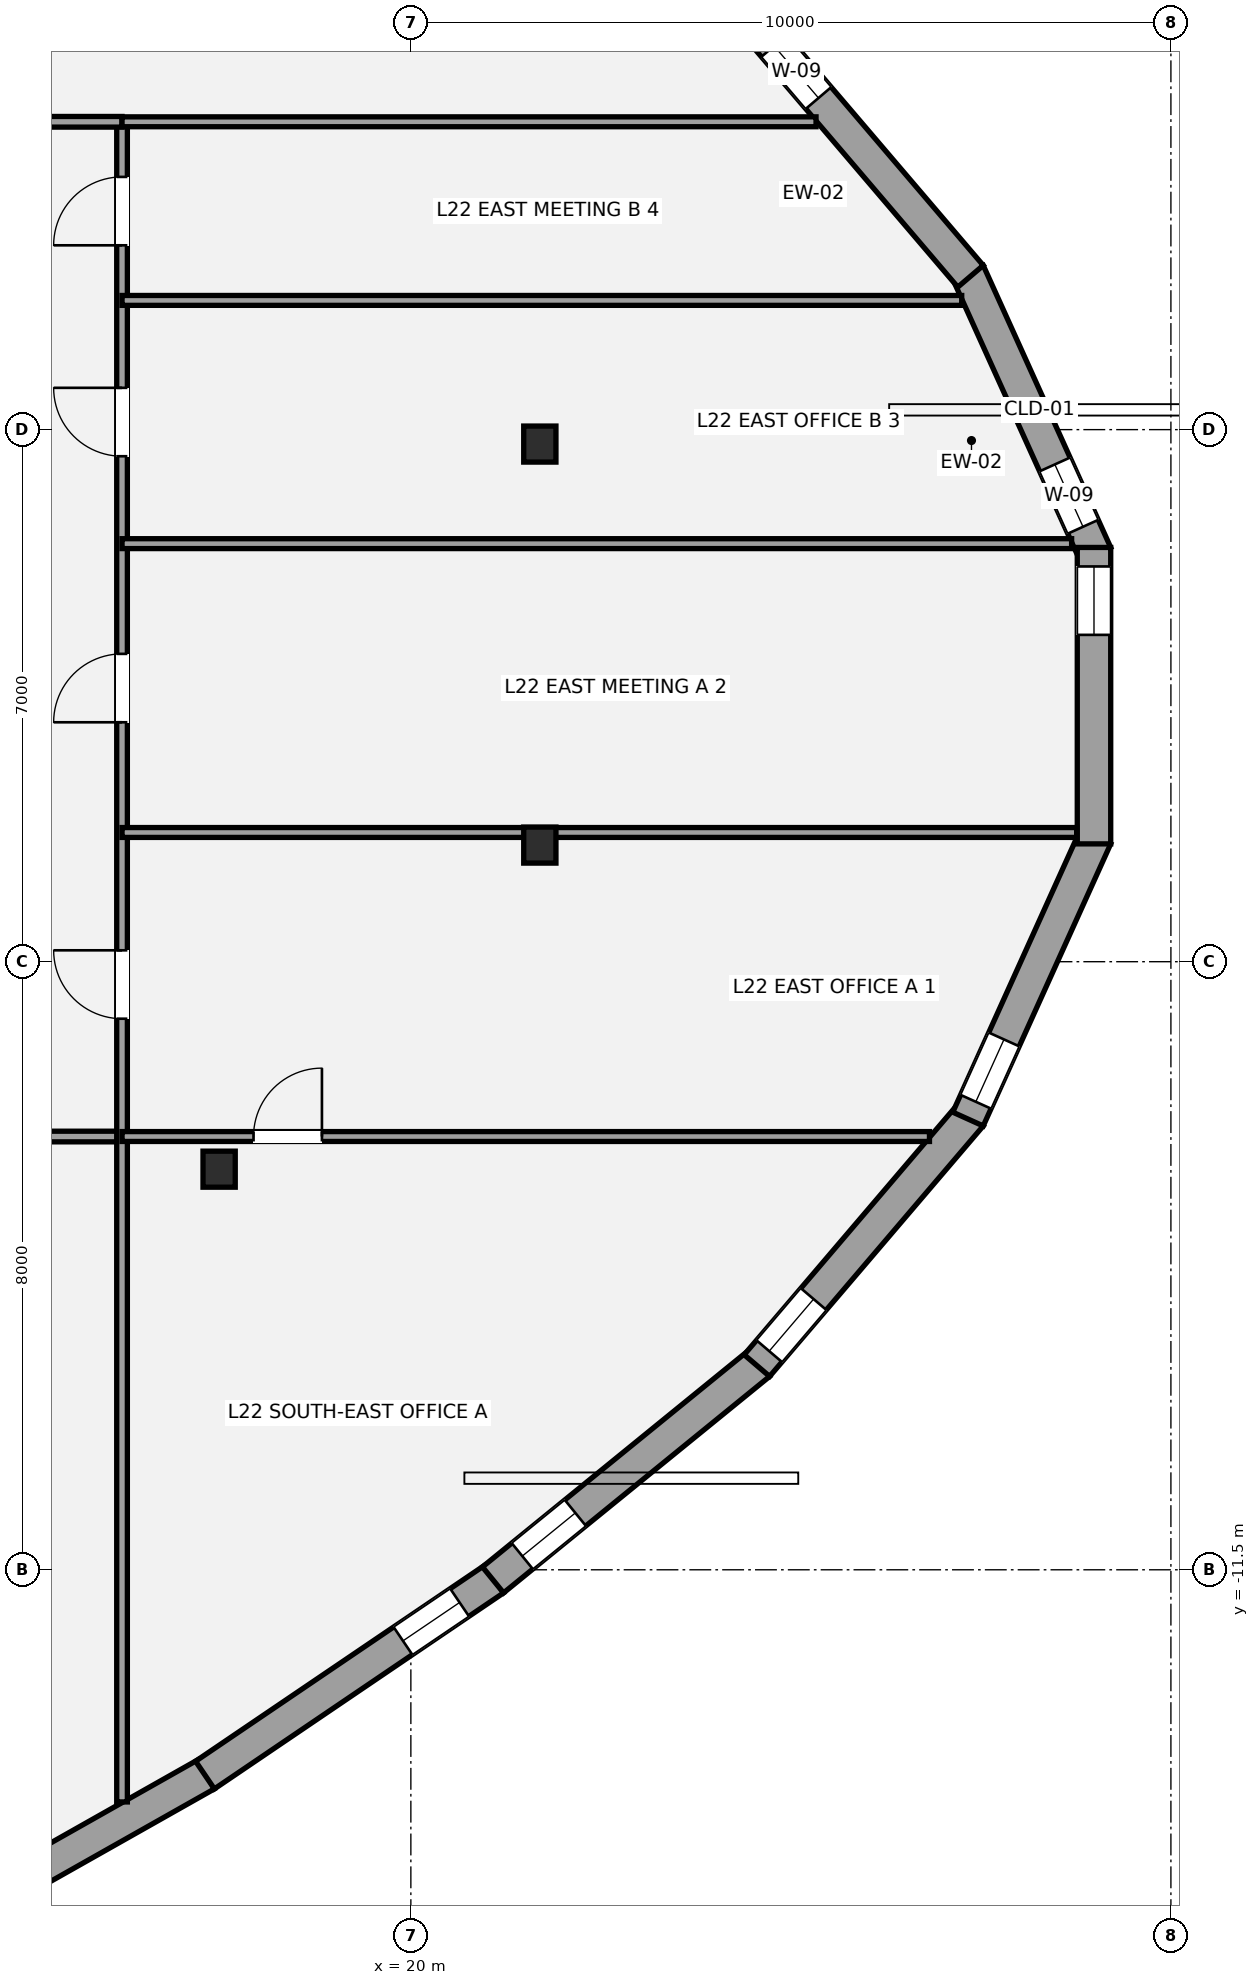
"""IFC4 building model, lengths in metres.
Left out: names, types, materials, properties, quantities, classifications, styles, units other than length and angle.
Written with IfcOpenShell. Run it as: python <this file> out.ifc"""

import sys

from ifc_helpers import new_model, si_unit, direction, frame, frame_2d, origin, origin_2d, place, context, subcontext, project, spatial, rectangle, i_section, extrude, element, fill, save


model = new_model("IFC4")
c1 = context("Model", 3, precision=1e-05, world=origin(), true_north=direction((0.0, 1.0)))
c2 = subcontext(c1, "Body", "Model", "MODEL_VIEW")
j1 = project(units=[si_unit("LENGTHUNIT", "METRE"), si_unit("PLANEANGLEUNIT", "RADIAN")], contexts=[c1])
p1 = place(None, origin())
s1 = spatial("IfcSite", under=j1, at=p1, CompositionType="ELEMENT")
p2 = place(p1, origin())
s2 = spatial("IfcBuilding", under=s1, at=p2, CompositionType="ELEMENT")
p3 = place(p2, frame((0.0, 0.0, 86.1)))
s3 = spatial("IfcBuildingStorey", under=s2, at=p3, CompositionType="ELEMENT", Elevation=86.1)
for number, where, z_axis, x_axis in (
    (1, (21.697, 3.31, 0.0), (0.0, 0.0, 1.0), (1.0, 0.0, 0.0)),
    (2, (17.477, -6.229, 0.0), (0.0, 0.0, 1.0), (1.0, 0.0, 0.0)),
    (3, (21.697, -1.966, 0.0), (0.0, 0.0, 1.0), (1.0, 0.0, 0.0)),
):
    element("IfcColumn", number, at=place(p3, frame(where, z_axis=z_axis, x_axis=x_axis)), inside=s3, PredefinedType="COLUMN", context=c2, shape_type="SweptSolid", body=[
        extrude(i_section(OverallWidth=0.424, OverallDepth=0.474, WebThickness=0.048, FlangeThickness=0.077, at=origin_2d()), origin(), (0.0, 0.0, 1.0), 3.5),
    ])
p4 = place(p3, frame((27.331, 5.57, 0.0), z_axis=(0.0, 0.0, 1.0), x_axis=(0.411809988363, -0.911269736952, 0.0)))
e4 = element("IfcWall", 4, at=p4, inside=s3, PredefinedType="STANDARD", context=c2, shape_type="SweptSolid", body=[
    extrude(rectangle(XDim=4.072, YDim=0.44, at=frame_2d((2.036, 0.0))), origin(), (0.0, 0.0, 1.0), 2.528),
])
p5 = place(p4, frame((2.774, 0.0, 0.58)))
e5 = element("IfcOpeningElement", 5, at=p5, cuts=e4, PredefinedType="OPENING", context=c2, shape_type="SweptSolid", body=[
    extrude(rectangle(XDim=0.9, YDim=1.35, at=frame_2d((0.45, 0.675))), frame((0.0, 0.23, 0.0), z_axis=(0.0, -1.0, 0.0), x_axis=(1.0, 0.0, 0.0)), (0.0, 0.0, 1.0), 0.46),
])
p6 = place(p3, frame((24.553, 8.813, 0.0), z_axis=(0.0, 0.0, 1.0), x_axis=(0.648913975558, -0.760861782669, 0.0)))
e6 = element("IfcWall", 6, at=p6, inside=s3, PredefinedType="STANDARD", context=c2, shape_type="SweptSolid", body=[
    extrude(rectangle(XDim=4.331, YDim=0.44, at=frame_2d((2.166, 0.0))), origin(), (0.0, 0.0, 1.0), 2.528),
])
p7 = place(p6, frame((0.349, 0.0, 0.58)))
e7 = element("IfcOpeningElement", 7, at=p7, cuts=e6, PredefinedType="OPENING", context=c2, shape_type="SweptSolid", body=[
    extrude(rectangle(XDim=0.9, YDim=1.35, at=frame_2d((0.45, 0.675))), frame((0.0, 0.23, 0.0), z_axis=(0.0, -1.0, 0.0), x_axis=(1.0, 0.0, 0.0)), (0.0, 0.0, 1.0), 0.46),
])
p8 = place(p3, frame((17.306, -14.191, 0.0), z_axis=(0.0, 0.0, 1.0), x_axis=(-0.870732411856, -0.491757121903, 0.0)))
e8 = element("IfcWall", 8, at=p8, inside=s3, PredefinedType="STANDARD", context=c2, shape_type="SweptSolid", body=[
    extrude(rectangle(XDim=4.825, YDim=0.44, at=frame_2d((2.413, 0.0))), origin(), (0.0, 0.0, 1.0), 2.528),
])
p9 = place(p8, frame((3.278, 0.0, 0.58)))
e9 = element("IfcOpeningElement", 9, at=p9, cuts=e8, PredefinedType="OPENING", context=c2, shape_type="SweptSolid", body=[
    extrude(rectangle(XDim=0.9, YDim=1.35, at=frame_2d((0.45, 0.675))), frame((0.0, 0.23, 0.0), z_axis=(0.0, -1.0, 0.0), x_axis=(1.0, 0.0, 0.0)), (0.0, 0.0, 1.0), 0.46),
])
p10 = place(p3, frame((21.096, -11.622, 0.0), z_axis=(0.0, 0.0, 1.0), x_axis=(-0.827777061901, -0.561057159112, 0.0)))
e10 = element("IfcWall", 10, at=p10, inside=s3, PredefinedType="STANDARD", context=c2, shape_type="SweptSolid", body=[
    extrude(rectangle(XDim=4.597, YDim=0.44, at=frame_2d((2.298, 0.0))), origin(), (0.0, 0.0, 1.0), 2.528),
])
p11 = place(p10, frame((0.55, 0.0, 0.58)))
e11 = element("IfcOpeningElement", 11, at=p11, cuts=e10, PredefinedType="OPENING", context=c2, shape_type="SweptSolid", body=[
    extrude(rectangle(XDim=0.9, YDim=1.35, at=frame_2d((0.45, 0.675))), frame((0.0, 0.23, 0.0), z_axis=(0.0, -1.0, 0.0), x_axis=(1.0, 0.0, 0.0)), (0.0, 0.0, 1.0), 0.46),
])
p12 = place(p3, frame((24.582, -8.785, 0.0), z_axis=(0.0, 0.0, 1.0), x_axis=(-0.775728286929, -0.631067052585, 0.0)))
e12 = element("IfcWall", 12, at=p12, inside=s3, PredefinedType="STANDARD", context=c2, shape_type="SweptSolid", body=[
    extrude(rectangle(XDim=4.513, YDim=0.44, at=frame_2d((2.256, 0.0))), origin(), (0.0, 0.0, 1.0), 2.528),
])
p13 = place(p12, frame((3.116, 0.0, 0.58)))
e13 = element("IfcOpeningElement", 13, at=p13, cuts=e12, PredefinedType="OPENING", context=c2, shape_type="SweptSolid", body=[
    extrude(rectangle(XDim=0.9, YDim=1.35, at=frame_2d((0.45, 0.675))), frame((0.0, 0.23, 0.0), z_axis=(0.0, -1.0, 0.0), x_axis=(1.0, 0.0, 0.0)), (0.0, 0.0, 1.0), 0.46),
])
p14 = place(p3, frame((27.364, -5.518, 0.0), z_axis=(0.0, 0.0, 1.0), x_axis=(-0.648913975558, -0.760861782669, 0.0)))
e14 = element("IfcWall", 14, at=p14, inside=s3, PredefinedType="STANDARD", context=c2, shape_type="SweptSolid", body=[
    extrude(rectangle(XDim=4.331, YDim=0.44, at=frame_2d((2.166, 0.0))), origin(), (0.0, 0.0, 1.0), 2.528),
])
p15 = place(p14, frame((3.181, 0.0, 0.58)))
e15 = element("IfcOpeningElement", 15, at=p15, cuts=e14, PredefinedType="OPENING", context=c2, shape_type="SweptSolid", body=[
    extrude(rectangle(XDim=0.9, YDim=1.35, at=frame_2d((0.45, 0.675))), frame((0.0, 0.23, 0.0), z_axis=(0.0, -1.0, 0.0), x_axis=(1.0, 0.0, 0.0)), (0.0, 0.0, 1.0), 0.46),
])
p16 = place(p3, frame((29.008, -1.859, 0.0), z_axis=(0.0, 0.0, 1.0), x_axis=(-0.411809988363, -0.911269736952, 0.0)))
e16 = element("IfcWall", 16, at=p16, inside=s3, PredefinedType="STANDARD", context=c2, shape_type="SweptSolid", body=[
    extrude(rectangle(XDim=4.072, YDim=0.44, at=frame_2d((2.036, 0.0))), origin(), (0.0, 0.0, 1.0), 2.528),
])
p17 = place(p16, frame((2.923, 0.0, 0.58)))
e17 = element("IfcOpeningElement", 17, at=p17, cuts=e16, PredefinedType="OPENING", context=c2, shape_type="SweptSolid", body=[
    extrude(rectangle(XDim=0.9, YDim=1.35, at=frame_2d((0.45, 0.675))), frame((0.0, 0.23, 0.0), z_axis=(0.0, -1.0, 0.0), x_axis=(1.0, 0.0, 0.0)), (0.0, 0.0, 1.0), 0.46),
])
p18 = place(p3, frame((28.988, 1.95, 0.0), z_axis=(0.0, 0.0, 1.0), x_axis=(0.0, -1.0, 0.0)))
e18 = element("IfcWall", 18, at=p18, inside=s3, PredefinedType="STANDARD", context=c2, shape_type="SweptSolid", body=[
    extrude(rectangle(XDim=3.9, YDim=0.44, at=frame_2d((1.95, 0.0))), origin(), (0.0, 0.0, 1.0), 2.528),
])
p19 = place(p18, frame((0.25, 0.0, 0.58)))
e19 = element("IfcOpeningElement", 19, at=p19, cuts=e18, PredefinedType="OPENING", context=c2, shape_type="SweptSolid", body=[
    extrude(rectangle(XDim=0.9, YDim=1.35, at=frame_2d((0.45, 0.675))), frame((0.0, 0.23, 0.0), z_axis=(0.0, -1.0, 0.0), x_axis=(1.0, 0.0, 0.0)), (0.0, 0.0, 1.0), 0.46),
])
p20 = place(p3, frame((-16.2, -5.8, 0.0), z_axis=(0.0, 0.0, 1.0), x_axis=(1.0, 0.0, 0.0)))
e20 = element("IfcWall", 20, at=p20, inside=s3, PredefinedType="PARTITIONING", context=c2, shape_type="SweptSolid", body=[
    extrude(rectangle(XDim=32.4, YDim=0.14, at=frame_2d((16.2, 0.0))), origin(), (0.0, 0.0, 1.0), 2.763),
])
p21 = place(p20, frame((4.25, 0.0, 0.0)))
e21 = element("IfcOpeningElement", 21, at=p21, cuts=e20, PredefinedType="OPENING", context=c2, shape_type="SweptSolid", body=[
    extrude(rectangle(XDim=0.9, YDim=2.1, at=frame_2d((0.45, 1.05))), frame((0.0, 0.08, 0.0), z_axis=(0.0, -1.0, 0.0), x_axis=(1.0, 0.0, 0.0)), (0.0, 0.0, 1.0), 0.16),
])
p22 = place(p20, frame((13.15, 0.0, 0.0)))
e22 = element("IfcOpeningElement", 22, at=p22, cuts=e20, PredefinedType="OPENING", context=c2, shape_type="SweptSolid", body=[
    extrude(rectangle(XDim=1.5, YDim=2.15, at=frame_2d((0.75, 1.075))), frame((0.0, 0.08, 0.0), z_axis=(0.0, -1.0, 0.0), x_axis=(1.0, 0.0, 0.0)), (0.0, 0.0, 1.0), 0.16),
])
p23 = place(p20, frame((21.45, 0.0, 0.0)))
e23 = element("IfcOpeningElement", 23, at=p23, cuts=e20, PredefinedType="OPENING", context=c2, shape_type="SweptSolid", body=[
    extrude(rectangle(XDim=0.9, YDim=2.1, at=frame_2d((0.45, 1.05))), frame((0.0, 0.08, 0.0), z_axis=(0.0, -1.0, 0.0), x_axis=(1.0, 0.0, 0.0)), (0.0, 0.0, 1.0), 0.16),
])
p24 = place(p20, frame((28.15, 0.0, 0.0)))
e24 = element("IfcOpeningElement", 24, at=p24, cuts=e20, PredefinedType="OPENING", context=c2, shape_type="SweptSolid", body=[
    extrude(rectangle(XDim=1.5, YDim=2.15, at=frame_2d((0.75, 1.075))), frame((0.0, 0.08, 0.0), z_axis=(0.0, -1.0, 0.0), x_axis=(1.0, 0.0, 0.0)), (0.0, 0.0, 1.0), 0.16),
])
p25 = place(p3, frame((16.2, -14.554, 0.0), z_axis=(0.0, 0.0, 1.0), x_axis=(0.0, 1.0, 0.0)))
e25 = element("IfcWall", 25, at=p25, inside=s3, PredefinedType="PARTITIONING", context=c2, shape_type="SweptSolid", body=[
    extrude(rectangle(XDim=22.104, YDim=0.14, at=frame_2d((11.052, 0.0))), origin(), (0.0, 0.0, 1.0), 2.751),
])
p26 = place(p25, frame((10.304, 0.0, 0.0)))
e26 = element("IfcOpeningElement", 26, at=p26, cuts=e25, PredefinedType="OPENING", context=c2, shape_type="SweptSolid", body=[
    extrude(rectangle(XDim=0.9, YDim=2.1, at=frame_2d((0.45, 1.05))), frame((0.0, 0.08, 0.0), z_axis=(0.0, -1.0, 0.0), x_axis=(1.0, 0.0, 0.0)), (0.0, 0.0, 1.0), 0.16),
])
p27 = place(p25, frame((14.204, 0.0, 0.0)))
e27 = element("IfcOpeningElement", 27, at=p27, cuts=e25, PredefinedType="OPENING", context=c2, shape_type="SweptSolid", body=[
    extrude(rectangle(XDim=0.9, YDim=2.1, at=frame_2d((0.45, 1.05))), frame((0.0, 0.08, 0.0), z_axis=(0.0, -1.0, 0.0), x_axis=(1.0, 0.0, 0.0)), (0.0, 0.0, 1.0), 0.16),
])
p28 = place(p25, frame((17.704, 0.0, 0.0)))
e28 = element("IfcOpeningElement", 28, at=p28, cuts=e25, PredefinedType="OPENING", context=c2, shape_type="SweptSolid", body=[
    extrude(rectangle(XDim=0.9, YDim=2.1, at=frame_2d((0.45, 1.05))), frame((0.0, 0.08, 0.0), z_axis=(0.0, -1.0, 0.0), x_axis=(1.0, 0.0, 0.0)), (0.0, 0.0, 1.0), 0.16),
])
p29 = place(p25, frame((20.479, 0.0, 0.0)))
e29 = element("IfcOpeningElement", 29, at=p29, cuts=e25, PredefinedType="OPENING", context=c2, shape_type="SweptSolid", body=[
    extrude(rectangle(XDim=0.9, YDim=2.1, at=frame_2d((0.45, 1.05))), frame((0.0, 0.08, 0.0), z_axis=(0.0, -1.0, 0.0), x_axis=(1.0, 0.0, 0.0)), (0.0, 0.0, 1.0), 0.16),
])
p30 = place(p3, frame((13.9, 7.55, 0.0), z_axis=(0.0, 0.0, 1.0), x_axis=(1.0, 0.0, 0.0)))
e30 = element("IfcWall", 30, at=p30, inside=s3, PredefinedType="PARTITIONING", context=c2, shape_type="SweptSolid", body=[
    extrude(rectangle(XDim=2.3, YDim=0.14, at=frame_2d((1.15, 0.0))), origin(), (0.0, 0.0, 1.0), 2.763),
])
p31 = place(p30, frame((0.32, 0.0, 0.0)))
e31 = element("IfcOpeningElement", 31, at=p31, cuts=e30, PredefinedType="OPENING", context=c2, shape_type="SweptSolid", body=[
    extrude(rectangle(XDim=0.92, YDim=2.15, at=frame_2d((0.46, 1.075))), frame((0.0, 0.08, 0.0), z_axis=(0.0, -1.0, 0.0), x_axis=(1.0, 0.0, 0.0)), (0.0, 0.0, 1.0), 0.16),
])
p32 = place(p3, frame((16.2, 7.55, 0.0), z_axis=(0.0, 0.0, 1.0), x_axis=(1.0, 0.0, 0.0)))
e32 = element("IfcWall", 32, at=p32, inside=s3, PredefinedType="PARTITIONING", context=c2, shape_type="SweptSolid", body=[
    extrude(rectangle(XDim=9.131, YDim=0.13, at=frame_2d((4.565, 0.0))), origin(), (0.0, 0.0, 1.0), 2.763),
])
p33 = place(p3, frame((16.2, -5.8, 0.0), z_axis=(0.0, 0.0, 1.0), x_axis=(1.0, 0.0, 0.0)))
e33 = element("IfcWall", 33, at=p33, inside=s3, PredefinedType="PARTITIONING", context=c2, shape_type="SweptSolid", body=[
    extrude(rectangle(XDim=10.624, YDim=0.13, at=frame_2d((5.312, 0.0))), origin(), (0.0, 0.0, 1.0), 2.688),
])
p34 = place(p33, frame((1.73, 0.0, 0.0)))
e34 = element("IfcOpeningElement", 34, at=p34, cuts=e33, PredefinedType="OPENING", context=c2, shape_type="SweptSolid", body=[
    extrude(rectangle(XDim=0.9, YDim=2.1, at=frame_2d((0.45, 1.05))), frame((0.0, 0.075, 0.0), z_axis=(0.0, -1.0, 0.0), x_axis=(1.0, 0.0, 0.0)), (0.0, 0.0, 1.0), 0.15),
])
p35 = place(p3, frame((16.2, -1.8, 0.0), z_axis=(0.0, 0.0, 1.0), x_axis=(1.0, 0.0, 0.0)))
e35 = element("IfcWall", 35, at=p35, inside=s3, PredefinedType="PARTITIONING", context=c2, shape_type="SweptSolid", body=[
    extrude(rectangle(XDim=12.56, YDim=0.13, at=frame_2d((6.28, 0.0))), origin(), (0.0, 0.0, 1.0), 2.751),
])
p36 = place(p3, frame((16.2, 2.0, 0.0), z_axis=(0.0, 0.0, 1.0), x_axis=(1.0, 0.0, 0.0)))
e36 = element("IfcWall", 36, at=p36, inside=s3, PredefinedType="PARTITIONING", context=c2, shape_type="SweptSolid", body=[
    extrude(rectangle(XDim=12.494, YDim=0.13, at=frame_2d((6.247, 0.0))), origin(), (0.0, 0.0, 1.0), 2.751),
])
p37 = place(p3, frame((16.2, 5.2, 0.0), z_axis=(0.0, 0.0, 1.0), x_axis=(1.0, 0.0, 0.0)))
e37 = element("IfcWall", 37, at=p37, inside=s3, PredefinedType="PARTITIONING", context=c2, shape_type="SweptSolid", body=[
    extrude(rectangle(XDim=11.048, YDim=0.13, at=frame_2d((5.524, 0.0))), origin(), (0.0, 0.0, 1.0), 2.763),
])
p38 = place(p5, origin())
e38 = element("IfcWindow", 38, at=p38, inside=s3, PartitioningType="SINGLE_PANEL", PredefinedType="WINDOW", context=c2, shape_type="SweptSolid", body=[
    extrude(rectangle(XDim=0.9, YDim=1.35, at=frame_2d((0.45, 0.675))), frame((0.0, -0.01, 0.0), z_axis=(0.0, -1.0, 0.0), x_axis=(1.0, 0.0, 0.0)), (0.0, 0.0, 1.0), 0.06),
])
fill(e5, e38)
p39 = place(p7, origin())
e39 = element("IfcWindow", 39, at=p39, inside=s3, PartitioningType="SINGLE_PANEL", PredefinedType="WINDOW", context=c2, shape_type="SweptSolid", body=[
    extrude(rectangle(XDim=0.9, YDim=1.35, at=frame_2d((0.45, 0.675))), frame((0.0, -0.01, 0.0), z_axis=(0.0, -1.0, 0.0), x_axis=(1.0, 0.0, 0.0)), (0.0, 0.0, 1.0), 0.06),
])
fill(e7, e39)
p40 = place(p11, origin())
e40 = element("IfcWindow", 40, at=p40, inside=s3, PartitioningType="SINGLE_PANEL", PredefinedType="WINDOW", context=c2, shape_type="SweptSolid", body=[
    extrude(rectangle(XDim=0.9, YDim=1.35, at=frame_2d((0.45, 0.675))), frame((0.0, -0.01, 0.0), z_axis=(0.0, -1.0, 0.0), x_axis=(1.0, 0.0, 0.0)), (0.0, 0.0, 1.0), 0.06),
])
fill(e11, e40)
p41 = place(p13, origin())
e41 = element("IfcWindow", 41, at=p41, inside=s3, PartitioningType="SINGLE_PANEL", PredefinedType="WINDOW", context=c2, shape_type="SweptSolid", body=[
    extrude(rectangle(XDim=0.9, YDim=1.35, at=frame_2d((0.45, 0.675))), frame((0.0, -0.01, 0.0), z_axis=(0.0, -1.0, 0.0), x_axis=(1.0, 0.0, 0.0)), (0.0, 0.0, 1.0), 0.06),
])
fill(e13, e41)
p42 = place(p15, origin())
e42 = element("IfcWindow", 42, at=p42, inside=s3, PartitioningType="SINGLE_PANEL", PredefinedType="WINDOW", context=c2, shape_type="SweptSolid", body=[
    extrude(rectangle(XDim=0.9, YDim=1.35, at=frame_2d((0.45, 0.675))), frame((0.0, -0.01, 0.0), z_axis=(0.0, -1.0, 0.0), x_axis=(1.0, 0.0, 0.0)), (0.0, 0.0, 1.0), 0.06),
])
fill(e15, e42)
p43 = place(p17, origin())
e43 = element("IfcWindow", 43, at=p43, inside=s3, PartitioningType="SINGLE_PANEL", PredefinedType="WINDOW", context=c2, shape_type="SweptSolid", body=[
    extrude(rectangle(XDim=0.9, YDim=1.35, at=frame_2d((0.45, 0.675))), frame((0.0, -0.01, 0.0), z_axis=(0.0, -1.0, 0.0), x_axis=(1.0, 0.0, 0.0)), (0.0, 0.0, 1.0), 0.06),
])
fill(e17, e43)
p44 = place(p19, origin())
e44 = element("IfcWindow", 44, at=p44, inside=s3, PartitioningType="SINGLE_PANEL", PredefinedType="WINDOW", context=c2, shape_type="SweptSolid", body=[
    extrude(rectangle(XDim=0.9, YDim=1.35, at=frame_2d((0.45, 0.675))), frame((0.0, -0.01, 0.0), z_axis=(0.0, -1.0, 0.0), x_axis=(1.0, 0.0, 0.0)), (0.0, 0.0, 1.0), 0.06),
])
fill(e19, e44)
p45 = place(p34, origin())
e45 = element("IfcDoor", 45, at=p45, inside=s3, OperationType="SINGLE_SWING_RIGHT", PredefinedType="DOOR", context=c2, shape_type="SweptSolid", body=[
    extrude(rectangle(XDim=0.9, YDim=2.1, at=frame_2d((0.45, 1.05))), frame((0.0, 0.025, 0.0), z_axis=(0.0, -1.0, 0.0), x_axis=(1.0, 0.0, 0.0)), (0.0, 0.0, 1.0), 0.05),
])
fill(e34, e45)
p46 = place(p26, origin())
e46 = element("IfcDoor", 46, at=p46, inside=s3, OperationType="SINGLE_SWING_RIGHT", PredefinedType="DOOR", context=c2, shape_type="SweptSolid", body=[
    extrude(rectangle(XDim=0.9, YDim=2.1, at=frame_2d((0.45, 1.05))), frame((0.0, 0.025, 0.0), z_axis=(0.0, -1.0, 0.0), x_axis=(1.0, 0.0, 0.0)), (0.0, 0.0, 1.0), 0.05),
])
fill(e26, e46)
p47 = place(p27, origin())
e47 = element("IfcDoor", 47, at=p47, inside=s3, OperationType="SINGLE_SWING_LEFT", PredefinedType="DOOR", context=c2, shape_type="SweptSolid", body=[
    extrude(rectangle(XDim=0.9, YDim=2.1, at=frame_2d((0.45, 1.05))), frame((0.0, 0.025, 0.0), z_axis=(0.0, -1.0, 0.0), x_axis=(1.0, 0.0, 0.0)), (0.0, 0.0, 1.0), 0.05),
])
fill(e27, e47)
p48 = place(p28, origin())
e48 = element("IfcDoor", 48, at=p48, inside=s3, OperationType="SINGLE_SWING_RIGHT", PredefinedType="DOOR", context=c2, shape_type="SweptSolid", body=[
    extrude(rectangle(XDim=0.9, YDim=2.1, at=frame_2d((0.45, 1.05))), frame((0.0, 0.025, 0.0), z_axis=(0.0, -1.0, 0.0), x_axis=(1.0, 0.0, 0.0)), (0.0, 0.0, 1.0), 0.05),
])
fill(e28, e48)
p49 = place(p29, origin())
e49 = element("IfcDoor", 49, at=p49, inside=s3, OperationType="SINGLE_SWING_LEFT", PredefinedType="DOOR", context=c2, shape_type="SweptSolid", body=[
    extrude(rectangle(XDim=0.9, YDim=2.1, at=frame_2d((0.45, 1.05))), frame((0.0, 0.025, 0.0), z_axis=(0.0, -1.0, 0.0), x_axis=(1.0, 0.0, 0.0)), (0.0, 0.0, 1.0), 0.05),
])
fill(e29, e49)
save(model, sys.argv[1])
